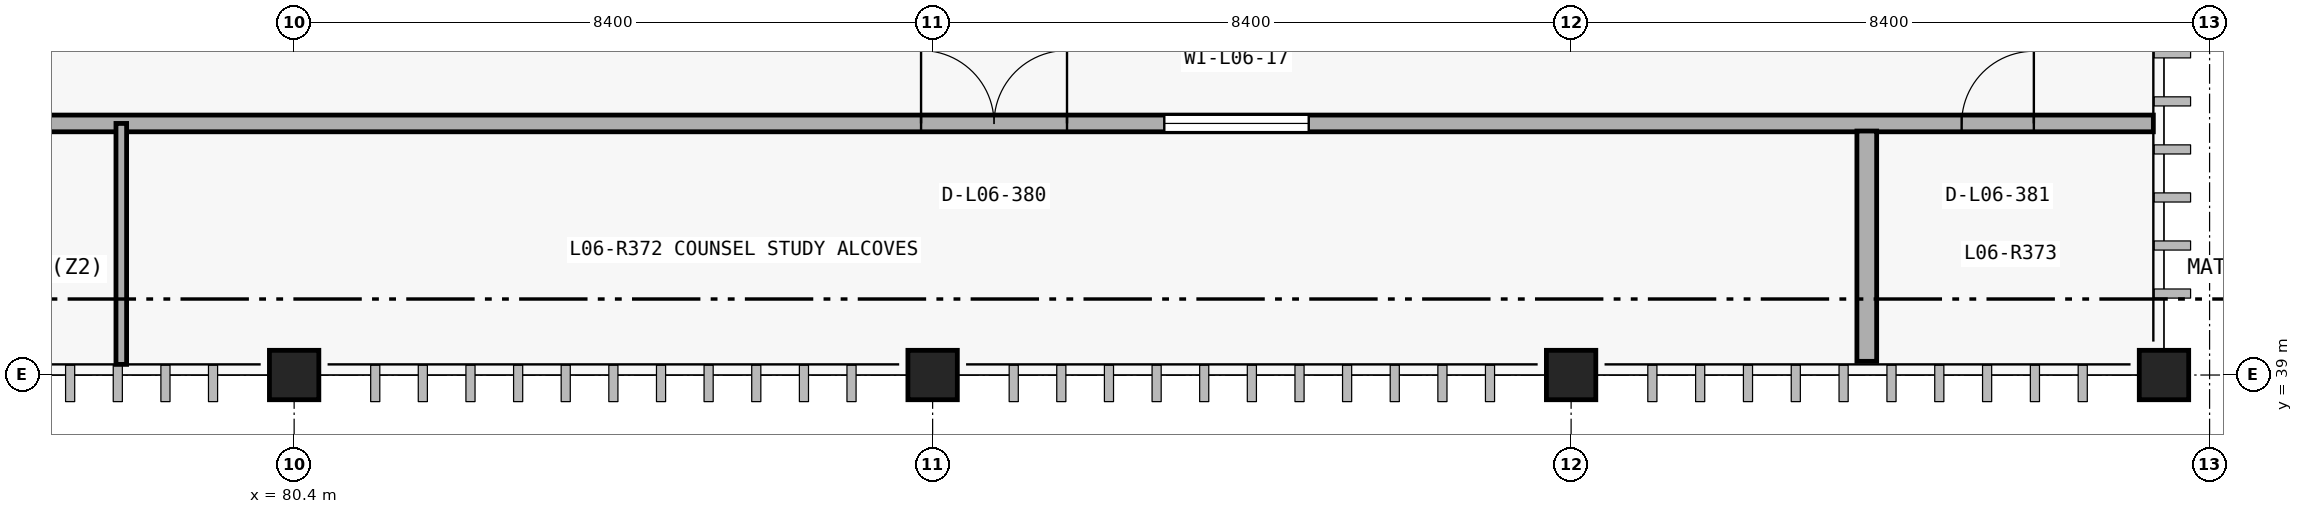
"""IFC4 building model, lengths in metres.
Left out: names, types, materials, properties, quantities, classifications, styles, units other than length and angle.
Written with IfcOpenShell. Run it as: python <this file> out.ifc"""

import sys

from ifc_helpers import new_model, si_unit, direction, frame, frame_2d, origin_with_axes, origin_2d_with_axis, place, context, subcontext, project, spatial, rectangle, circle, extrude, element, fill, save


model = new_model("IFC4")
c1 = context("Model", 3, precision=1e-05, world=origin_with_axes(), true_north=direction((0.0, 1.0)))
c2 = subcontext(c1, "Body", "Model", "MODEL_VIEW")
j1 = project(units=[si_unit("LENGTHUNIT", "METRE"), si_unit("PLANEANGLEUNIT", "RADIAN")], contexts=[c1])
p1 = place(None, origin_with_axes())
s1 = spatial("IfcSite", under=j1, at=p1, CompositionType="ELEMENT")
p2 = place(p1, origin_with_axes())
s2 = spatial("IfcBuilding", under=s1, at=p2, CompositionType="ELEMENT")
p3 = place(p2, frame((0.0, 0.0, 29.7), z_axis=(0.0, 0.0, 1.0), x_axis=(1.0, 0.0, 0.0)))
s3 = spatial("IfcBuildingStorey", under=s2, at=p3, CompositionType="ELEMENT", Elevation=29.7)
p4 = place(None, frame((55.34, 42.31, 29.7), z_axis=(0.0, 0.0, 1.0), x_axis=(1.0, 0.0, 0.0)))
e1 = element("IfcWall", 1, at=p4, inside=s3, PredefinedType="PARTITIONING", context=c2, shape_type="SweptSolid", body=[
    extrude(rectangle(XDim=49.52, YDim=0.22, at=frame_2d((24.76, 0.0), x_axis=(1.0, 0.0))), origin_with_axes(), (0.0, 0.0, 1.0), 4.48),
])
p5 = place(None, frame((66.895, 42.31, 29.7), z_axis=(0.0, 0.0, 1.0), x_axis=(1.0, 0.0, 0.0)))
e2 = element("IfcOpeningElement", 2, at=p5, cuts=e1, PredefinedType="OPENING", context=c2, shape_type="SweptSolid", body=[
    extrude(rectangle(XDim=0.96, YDim=2.2, at=frame_2d((0.0, 1.1), x_axis=(1.0, 0.0))), frame((0.0, 0.12, 0.0), z_axis=(0.0, -1.0, 0.0), x_axis=(1.0, 0.0, 0.0)), (0.0, 0.0, 1.0), 0.24),
])
p6 = place(None, frame((89.608, 42.31, 29.7), z_axis=(0.0, 0.0, 1.0), x_axis=(1.0, 0.0, 0.0)))
e3 = element("IfcOpeningElement", 3, at=p6, cuts=e1, PredefinedType="OPENING", context=c2, shape_type="SweptSolid", body=[
    extrude(rectangle(XDim=1.92, YDim=2.64, at=frame_2d((0.0, 1.32), x_axis=(1.0, 0.0))), frame((0.0, 0.12, 0.0), z_axis=(0.0, -1.0, 0.0), x_axis=(1.0, 0.0, 0.0)), (0.0, 0.0, 1.0), 0.24),
])
p7 = place(None, frame((102.813, 42.31, 29.7), z_axis=(0.0, 0.0, 1.0), x_axis=(1.0, 0.0, 0.0)))
e4 = element("IfcOpeningElement", 4, at=p7, cuts=e1, PredefinedType="OPENING", context=c2, shape_type="SweptSolid", body=[
    extrude(rectangle(XDim=0.95, YDim=2.1, at=frame_2d((0.0, 1.05), x_axis=(1.0, 0.0))), frame((0.0, 0.12, 0.0), z_axis=(0.0, -1.0, 0.0), x_axis=(1.0, 0.0, 0.0)), (0.0, 0.0, 1.0), 0.24),
])
p8 = place(None, frame((92.798, 42.31, 30.75), z_axis=(0.0, 0.0, 1.0), x_axis=(1.0, 0.0, 0.0)))
e5 = element("IfcOpeningElement", 5, at=p8, cuts=e1, PredefinedType="OPENING", context=c2, shape_type="SweptSolid", body=[
    extrude(rectangle(XDim=1.9, YDim=1.5, at=frame_2d((0.0, 0.75), x_axis=(1.0, 0.0))), frame((0.0, 0.12, 0.0), z_axis=(0.0, -1.0, 0.0), x_axis=(1.0, 0.0, 0.0)), (0.0, 0.0, 1.0), 0.24),
])
p9 = place(None, frame((101.09, 39.18, 29.7), z_axis=(0.0, 0.0, 1.0), x_axis=(0.0, 1.0, 0.0)))
e6 = element("IfcWall", 6, at=p9, inside=s3, PredefinedType="PLUMBINGWALL", context=c2, shape_type="SweptSolid", body=[
    extrude(rectangle(XDim=3.03, YDim=0.26, at=frame_2d((1.515, 0.0), x_axis=(1.0, 0.0))), origin_with_axes(), (0.0, 0.0, 1.0), 4.48),
])
p10 = place(None, frame((78.126, 39.14, 29.7), z_axis=(0.0, 0.0, 1.0), x_axis=(0.0, 1.0, 0.0)))
e7 = element("IfcWall", 7, at=p10, inside=s3, PredefinedType="PARTITIONING", context=c2, shape_type="SweptSolid", body=[
    extrude(rectangle(XDim=3.17, YDim=0.14, at=frame_2d((1.585, 0.0), x_axis=(1.0, 0.0))), origin_with_axes(), (0.0, 0.0, 1.0), 4.48),
])
for number, where, z_axis, x_axis in (
    (8, (80.4, 39.0, 29.7), (0.0, 0.0, 1.0), (1.0, 0.0, 0.0)),
    (9, (88.8, 39.0, 29.7), (0.0, 0.0, 1.0), (1.0, 0.0, 0.0)),
    (10, (97.2, 39.0, 29.7), (0.0, 0.0, 1.0), (1.0, 0.0, 0.0)),
    (11, (105.0, 39.0, 29.7), (0.0, 0.0, 1.0), (1.0, 0.0, 0.0)),
):
    element("IfcColumn", number, at=place(None, frame(where, z_axis=z_axis, x_axis=x_axis)), inside=s3, PredefinedType="COLUMN", context=c2, shape_type="SweptSolid", body=[
        extrude(circle(Radius=0.325, at=origin_2d_with_axis()), origin_with_axes(), (0.0, 0.0, 1.0), 4.8),
    ])
p11 = place(None, frame((89.608, 42.31, 29.7), z_axis=(0.0, 0.0, 1.0), x_axis=(1.0, 0.0, 0.0)))
e12 = element("IfcDoor", 12, at=p11, inside=s3, OperationType="DOUBLE_DOOR_SINGLE_SWING", PredefinedType="DOOR", context=c2, shape_type="SweptSolid", body=[
    extrude(rectangle(XDim=1.92, YDim=2.64, at=frame_2d((0.0, 1.32), x_axis=(1.0, 0.0))), frame((0.0, 0.04, 0.0), z_axis=(0.0, -1.0, 0.0), x_axis=(1.0, 0.0, 0.0)), (0.0, 0.0, 1.0), 0.08),
])
fill(e3, e12)
p12 = place(None, frame((102.813, 42.31, 29.7), z_axis=(0.0, 0.0, 1.0), x_axis=(1.0, 0.0, 0.0)))
e13 = element("IfcDoor", 13, at=p12, inside=s3, OperationType="SINGLE_SWING_RIGHT", PredefinedType="DOOR", context=c2, shape_type="SweptSolid", body=[
    extrude(rectangle(XDim=0.95, YDim=2.1, at=frame_2d((0.0, 1.05), x_axis=(1.0, 0.0))), frame((0.0, 0.04, 0.0), z_axis=(0.0, -1.0, 0.0), x_axis=(1.0, 0.0, 0.0)), (0.0, 0.0, 1.0), 0.08),
])
fill(e4, e13)
p13 = place(None, frame((92.798, 42.31, 30.75), z_axis=(0.0, 0.0, 1.0), x_axis=(1.0, 0.0, 0.0)))
e14 = element("IfcWindow", 14, at=p13, inside=s3, PartitioningType="SINGLE_PANEL", PredefinedType="WINDOW", context=c2, shape_type="SweptSolid", body=[
    extrude(rectangle(XDim=1.9, YDim=1.5, at=frame_2d((0.0, 0.75), x_axis=(1.0, 0.0))), frame((0.0, 0.03, 0.0), z_axis=(0.0, -1.0, 0.0), x_axis=(1.0, 0.0, 0.0)), (0.0, 0.0, 1.0), 0.06),
])
fill(e5, e14)
save(model, sys.argv[1])
